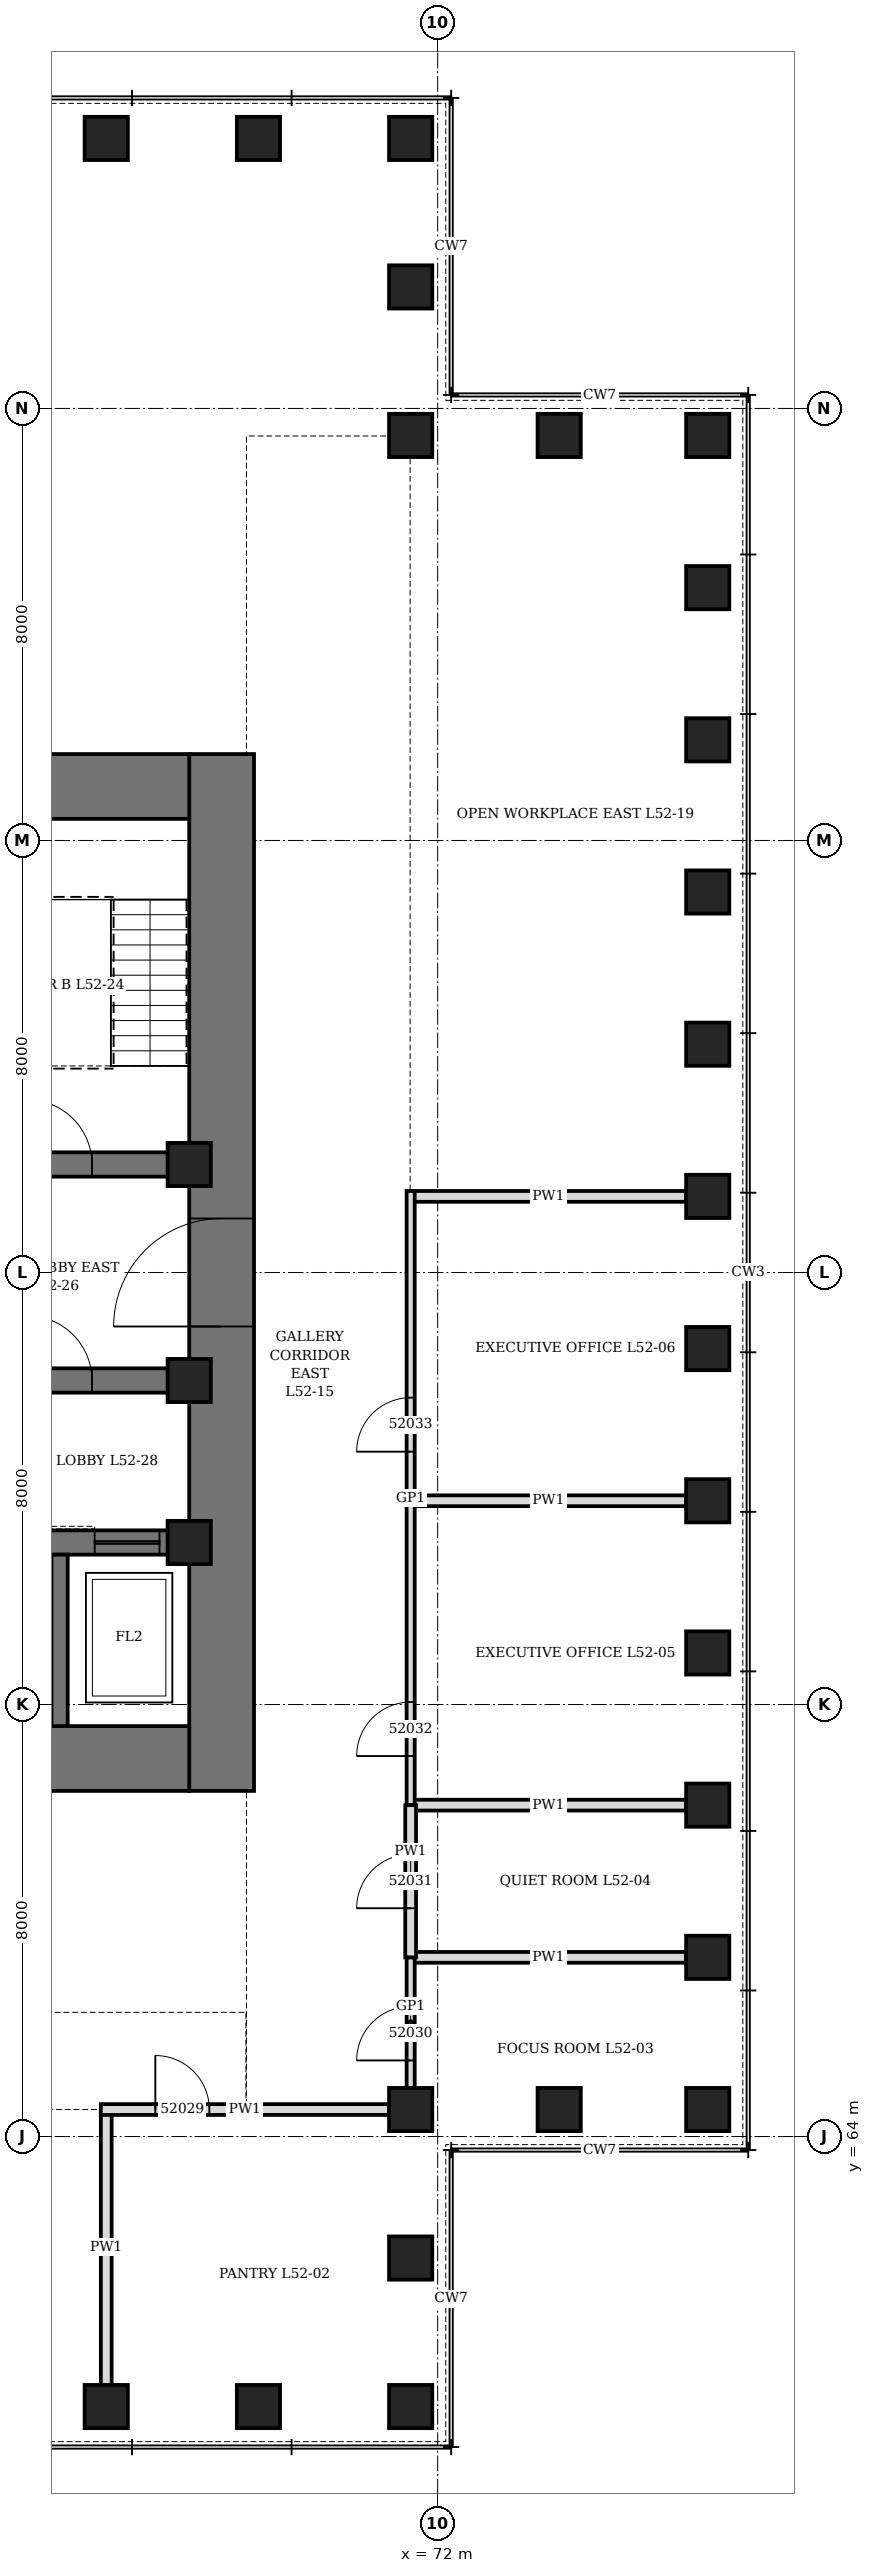
"""IFC4 building model, lengths in metres.
Left out: names, types, materials, properties, quantities, classifications, styles, units other than length and angle.
Written with IfcOpenShell. Run it as: python <this file> out.ifc"""

import sys

from ifc_helpers import new_model, si_unit, direction, frame, frame_2d, origin, origin_2d, place, context, subcontext, project, spatial, rectangle, hollow_rectangle, extrude, element, fill, save


model = new_model("IFC4")
c1 = context("Model", 3, precision=1e-05, world=origin(), true_north=direction((0.0, 1.0)))
c2 = subcontext(c1, "Body", "Model", "MODEL_VIEW")
j1 = project(units=[si_unit("LENGTHUNIT", "METRE"), si_unit("PLANEANGLEUNIT", "RADIAN")], contexts=[c1])
p1 = place(None, origin())
s1 = spatial("IfcSite", under=j1, at=p1, CompositionType="ELEMENT")
p2 = place(p1, origin())
s2 = spatial("IfcBuilding", under=s1, at=p2, CompositionType="ELEMENT")
p3 = place(p2, frame((0.0, 0.0, 231.7)))
s3 = spatial("IfcBuildingStorey", under=s2, at=p3, CompositionType="ELEMENT", Elevation=231.7)
for number, where, z_axis, x_axis in (
    (1, (65.864, 59.0, 0.0), (0.0, 0.0, 1.0), (1.0, 0.0, 0.0)),
    (2, (68.682, 59.0, 0.0), (0.0, 0.0, 1.0), (1.0, 0.0, 0.0)),
    (3, (71.5, 59.0, 0.0), (0.0, 0.0, 1.0), (0.0, 1.0, 0.0)),
    (4, (71.5, 61.75, 0.0), (0.0, 0.0, 1.0), (0.0, 1.0, 0.0)),
    (5, (71.5, 64.5, 0.0), (0.0, 0.0, 1.0), (1.0, 0.0, 0.0)),
    (6, (74.25, 64.5, 0.0), (0.0, 0.0, 1.0), (1.0, 0.0, 0.0)),
    (7, (77.0, 64.5, 0.0), (0.0, 0.0, 1.0), (0.0, 1.0, 0.0)),
    (8, (77.0, 67.318, 0.0), (0.0, 0.0, 1.0), (0.0, 1.0, 0.0)),
    (9, (77.0, 70.136, 0.0), (0.0, 0.0, 1.0), (0.0, 1.0, 0.0)),
    (10, (77.0, 72.955, 0.0), (0.0, 0.0, 1.0), (0.0, 1.0, 0.0)),
    (11, (77.0, 75.773, 0.0), (0.0, 0.0, 1.0), (0.0, 1.0, 0.0)),
    (12, (77.0, 78.591, 0.0), (0.0, 0.0, 1.0), (0.0, 1.0, 0.0)),
    (13, (77.0, 81.409, 0.0), (0.0, 0.0, 1.0), (0.0, 1.0, 0.0)),
    (14, (77.0, 84.227, 0.0), (0.0, 0.0, 1.0), (0.0, 1.0, 0.0)),
    (15, (77.0, 87.045, 0.0), (0.0, 0.0, 1.0), (0.0, 1.0, 0.0)),
    (16, (77.0, 89.864, 0.0), (0.0, 0.0, 1.0), (0.0, 1.0, 0.0)),
    (17, (77.0, 92.682, 0.0), (0.0, 0.0, 1.0), (0.0, 1.0, 0.0)),
    (18, (77.0, 95.5, 0.0), (0.0, 0.0, 1.0), (1.0, 0.0, 0.0)),
    (19, (74.25, 95.5, 0.0), (0.0, 0.0, 1.0), (1.0, 0.0, 0.0)),
    (20, (71.5, 95.5, 0.0), (0.0, 0.0, 1.0), (0.0, 1.0, 0.0)),
    (21, (71.5, 98.25, 0.0), (0.0, 0.0, 1.0), (0.0, 1.0, 0.0)),
    (22, (71.5, 101.0, 0.0), (0.0, 0.0, 1.0), (1.0, 0.0, 0.0)),
    (23, (68.682, 101.0, 0.0), (0.0, 0.0, 1.0), (1.0, 0.0, 0.0)),
    (24, (65.864, 101.0, 0.0), (0.0, 0.0, 1.0), (1.0, 0.0, 0.0)),
):
    element("IfcColumn", number, at=place(p3, frame(where, z_axis=z_axis, x_axis=x_axis)), inside=s3, PredefinedType="COLUMN", context=c2, shape_type="SweptSolid", body=[
        extrude(hollow_rectangle(XDim=0.8, YDim=0.8, WallThickness=0.08, at=origin_2d()), origin(), (0.0, 0.0, 1.0), 4.2),
    ])
p4 = place(p3, frame((68.0, 70.4, 0.0), z_axis=(0.0, 0.0, 1.0), x_axis=(0.0, 1.0, 0.0)))
e25 = element("IfcWall", 25, at=p4, inside=s3, PredefinedType="SHEAR", context=c2, shape_type="SweptSolid", body=[
    extrude(rectangle(XDim=19.2, YDim=1.2, at=frame_2d((9.6, 0.0))), origin(), (0.0, 0.0, 1.0), 4.2),
])
p5 = place(p4, frame((8.6, 0.0, 0.0)))
e26 = element("IfcOpeningElement", 26, at=p5, cuts=e25, PredefinedType="OPENING", context=c2, shape_type="SweptSolid", body=[
    extrude(rectangle(XDim=2.0, YDim=2.4, at=frame_2d((1.0, 1.2))), frame((0.0, 0.61, 0.0), z_axis=(0.0, -1.0, 0.0), x_axis=(1.0, 0.0, 0.0)), (0.0, 0.0, 1.0), 1.22),
])
p6 = place(p3, frame((44.6, 71.0, 0.0), z_axis=(0.0, 0.0, 1.0), x_axis=(1.0, 0.0, 0.0)))
e27 = element("IfcWall", 27, at=p6, inside=s3, PredefinedType="SHEAR", context=c2, shape_type="SweptSolid", body=[
    extrude(rectangle(XDim=22.8, YDim=1.2, at=frame_2d((11.4, 0.0))), origin(), (0.0, 0.0, 1.0), 4.2),
])
p7 = place(p6, frame((6.35, 0.0, 0.0)))
e28 = element("IfcOpeningElement", 28, at=p7, cuts=e27, PredefinedType="OPENING", context=c2, shape_type="SweptSolid", body=[
    extrude(rectangle(XDim=1.1, YDim=2.2, at=frame_2d((0.55, 1.1))), frame((0.0, 0.61, 0.0), z_axis=(0.0, -1.0, 0.0), x_axis=(1.0, 0.0, 0.0)), (0.0, 0.0, 1.0), 1.22),
])
p8 = place(p6, frame((9.35, 0.0, 0.0)))
e29 = element("IfcOpeningElement", 29, at=p8, cuts=e27, PredefinedType="OPENING", context=c2, shape_type="SweptSolid", body=[
    extrude(rectangle(XDim=1.1, YDim=2.2, at=frame_2d((0.55, 1.1))), frame((0.0, 0.61, 0.0), z_axis=(0.0, -1.0, 0.0), x_axis=(1.0, 0.0, 0.0)), (0.0, 0.0, 1.0), 1.22),
])
p9 = place(p6, frame((12.35, 0.0, 0.0)))
e30 = element("IfcOpeningElement", 30, at=p9, cuts=e27, PredefinedType="OPENING", context=c2, shape_type="SweptSolid", body=[
    extrude(rectangle(XDim=1.1, YDim=2.2, at=frame_2d((0.55, 1.1))), frame((0.0, 0.61, 0.0), z_axis=(0.0, -1.0, 0.0), x_axis=(1.0, 0.0, 0.0)), (0.0, 0.0, 1.0), 1.22),
])
p10 = place(p6, frame((15.35, 0.0, 0.0)))
e31 = element("IfcOpeningElement", 31, at=p10, cuts=e27, PredefinedType="OPENING", context=c2, shape_type="SweptSolid", body=[
    extrude(rectangle(XDim=1.1, YDim=2.2, at=frame_2d((0.55, 1.1))), frame((0.0, 0.61, 0.0), z_axis=(0.0, -1.0, 0.0), x_axis=(1.0, 0.0, 0.0)), (0.0, 0.0, 1.0), 1.22),
])
p11 = place(p3, frame((44.6, 89.0, 0.0), z_axis=(0.0, 0.0, 1.0), x_axis=(1.0, 0.0, 0.0)))
e32 = element("IfcWall", 32, at=p11, inside=s3, PredefinedType="SHEAR", context=c2, shape_type="SweptSolid", body=[
    extrude(rectangle(XDim=22.8, YDim=1.2, at=frame_2d((11.4, 0.0))), origin(), (0.0, 0.0, 1.0), 4.2),
])
p12 = place(p11, frame((7.9, 0.0, 0.0)))
e33 = element("IfcOpeningElement", 33, at=p12, cuts=e32, PredefinedType="OPENING", context=c2, shape_type="SweptSolid", body=[
    extrude(rectangle(XDim=1.0, YDim=2.1, at=frame_2d((0.5, 1.05))), frame((0.0, 0.61, 0.0), z_axis=(0.0, -1.0, 0.0), x_axis=(1.0, 0.0, 0.0)), (0.0, 0.0, 1.0), 1.22),
])
p13 = place(p11, frame((13.012, 0.0, 0.0)))
e34 = element("IfcOpeningElement", 34, at=p13, cuts=e32, PredefinedType="OPENING", context=c2, shape_type="SweptSolid", body=[
    extrude(rectangle(XDim=0.9, YDim=2.1, at=frame_2d((0.45, 1.05))), frame((0.0, 0.61, 0.0), z_axis=(0.0, -1.0, 0.0), x_axis=(1.0, 0.0, 0.0)), (0.0, 0.0, 1.0), 1.22),
])
p14 = place(p3, frame((62.225, 75.0, 0.0), z_axis=(0.0, 0.0, 1.0), x_axis=(1.0, 0.0, 0.0)))
e35 = element("IfcWall", 35, at=p14, inside=s3, PredefinedType="SHEAR", context=c2, shape_type="SweptSolid", body=[
    extrude(rectangle(XDim=5.175, YDim=0.45, at=frame_2d((2.587, 0.0))), origin(), (0.0, 0.0, 1.0), 4.2),
])
p15 = place(p14, frame((0.675, 0.0, 0.0)))
e36 = element("IfcOpeningElement", 36, at=p15, cuts=e35, PredefinedType="OPENING", context=c2, shape_type="SweptSolid", body=[
    extrude(rectangle(XDim=1.2, YDim=2.2, at=frame_2d((0.6, 1.1))), frame((0.0, 0.235, 0.0), z_axis=(0.0, -1.0, 0.0), x_axis=(1.0, 0.0, 0.0)), (0.0, 0.0, 1.0), 0.47),
])
p16 = place(p14, frame((3.425, 0.0, 0.0)))
e37 = element("IfcOpeningElement", 37, at=p16, cuts=e35, PredefinedType="OPENING", context=c2, shape_type="SweptSolid", body=[
    extrude(rectangle(XDim=1.2, YDim=2.2, at=frame_2d((0.6, 1.1))), frame((0.0, 0.235, 0.0), z_axis=(0.0, -1.0, 0.0), x_axis=(1.0, 0.0, 0.0)), (0.0, 0.0, 1.0), 0.47),
])
p17 = place(p3, frame((62.225, 78.0, 0.0), z_axis=(0.0, 0.0, 1.0), x_axis=(1.0, 0.0, 0.0)))
e38 = element("IfcWall", 38, at=p17, inside=s3, PredefinedType="SHEAR", context=c2, shape_type="SweptSolid", body=[
    extrude(rectangle(XDim=5.175, YDim=0.45, at=frame_2d((2.587, 0.0))), origin(), (0.0, 0.0, 1.0), 4.2),
])
p18 = place(p17, frame((2.175, 0.0, 0.0)))
e39 = element("IfcOpeningElement", 39, at=p18, cuts=e38, PredefinedType="OPENING", context=c2, shape_type="SweptSolid", body=[
    extrude(rectangle(XDim=1.2, YDim=2.1, at=frame_2d((0.6, 1.05))), frame((0.0, 0.235, 0.0), z_axis=(0.0, -1.0, 0.0), x_axis=(1.0, 0.0, 0.0)), (0.0, 0.0, 1.0), 0.47),
])
p19 = place(p3, frame((62.225, 82.0, 0.0), z_axis=(0.0, 0.0, 1.0), x_axis=(1.0, 0.0, 0.0)))
e40 = element("IfcWall", 40, at=p19, inside=s3, PredefinedType="SHEAR", context=c2, shape_type="SweptSolid", body=[
    extrude(rectangle(XDim=5.175, YDim=0.45, at=frame_2d((2.587, 0.0))), origin(), (0.0, 0.0, 1.0), 4.2),
])
p20 = place(p19, frame((2.175, 0.0, 0.0)))
e41 = element("IfcOpeningElement", 41, at=p20, cuts=e40, PredefinedType="OPENING", context=c2, shape_type="SweptSolid", body=[
    extrude(rectangle(XDim=1.2, YDim=2.1, at=frame_2d((0.6, 1.05))), frame((0.0, 0.235, 0.0), z_axis=(0.0, -1.0, 0.0), x_axis=(1.0, 0.0, 0.0)), (0.0, 0.0, 1.0), 0.47),
])
p21 = place(p3, frame((65.0, 71.6, 0.0), z_axis=(0.0, 0.0, 1.0), x_axis=(0.0, 1.0, 0.0)))
e42 = element("IfcWall", 42, at=p21, inside=s3, PredefinedType="SHEAR", context=c2, shape_type="SweptSolid", body=[
    extrude(rectangle(XDim=3.175, YDim=0.3, at=frame_2d((1.587, 0.0))), origin(), (0.0, 0.0, 1.0), 4.2),
])
for number, where, z_axis, x_axis in (
    (43, (67.4, 75.0, 0.0), (0.0, 0.0, 1.0), (1.0, 0.0, 0.0)),
    (44, (67.4, 78.0, 0.0), (0.0, 0.0, 1.0), (1.0, 0.0, 0.0)),
    (45, (67.4, 82.0, 0.0), (0.0, 0.0, 1.0), (1.0, 0.0, 0.0)),
):
    element("IfcColumn", number, at=place(p3, frame(where, z_axis=z_axis, x_axis=x_axis)), inside=s3, PredefinedType="COLUMN", context=c2, shape_type="SweptSolid", body=[
        extrude(hollow_rectangle(XDim=0.8, YDim=0.8, WallThickness=0.1, at=origin_2d()), origin(), (0.0, 0.0, 1.0), 4.2),
    ])
for number, where, z_axis, x_axis in (
    (46, (65.864, 59.4, 0.0), (0.0, 0.0, 1.0), (0.0, 1.0, 0.0)),
    (47, (71.5, 67.318, 0.0), (0.0, 0.0, 1.0), (1.0, 0.0, 0.0)),
    (48, (71.5, 70.136, 0.0), (0.0, 0.0, 1.0), (1.0, 0.0, 0.0)),
    (49, (71.5, 75.773, 0.0), (0.0, 0.0, 1.0), (1.0, 0.0, 0.0)),
    (50, (71.5, 81.409, 0.0), (0.0, 0.0, 1.0), (1.0, 0.0, 0.0)),
):
    element("IfcWall", number, at=place(p3, frame(where, z_axis=z_axis, x_axis=x_axis)), inside=s3, PredefinedType="PARTITIONING", context=c2, shape_type="SweptSolid", body=[
        extrude(rectangle(XDim=5.1, YDim=0.2, at=frame_2d((2.55, 0.0))), origin(), (0.0, 0.0, 1.0), 3.428),
    ])
p22 = place(p3, frame((65.764, 64.5, 0.0), z_axis=(0.0, 0.0, 1.0), x_axis=(1.0, 0.0, 0.0)))
e51 = element("IfcWall", 51, at=p22, inside=s3, PredefinedType="PARTITIONING", context=c2, shape_type="SweptSolid", body=[
    extrude(rectangle(XDim=5.336, YDim=0.2, at=frame_2d((2.668, 0.0))), origin(), (0.0, 0.0, 1.0), 4.04),
])
p23 = place(p22, frame((1.009, 0.0, 0.0)))
e52 = element("IfcOpeningElement", 52, at=p23, cuts=e51, PredefinedType="OPENING", context=c2, shape_type="SweptSolid", body=[
    extrude(rectangle(XDim=1.0, YDim=2.1, at=frame_2d((0.5, 1.05))), frame((0.0, 0.11, 0.0), z_axis=(0.0, -1.0, 0.0), x_axis=(1.0, 0.0, 0.0)), (0.0, 0.0, 1.0), 0.22),
])
p24 = place(p3, frame((71.5, 64.9, 0.0), z_axis=(0.0, 0.0, 1.0), x_axis=(0.0, 1.0, 0.0)))
e53 = element("IfcWall", 53, at=p24, inside=s3, PredefinedType="PARTITIONING", context=c2, shape_type="SweptSolid", body=[
    extrude(rectangle(XDim=2.418, YDim=0.15, at=frame_2d((1.209, 0.0))), origin(), (0.0, 0.0, 1.0), 4.04),
])
p25 = place(p24, frame((0.509, 0.0, 0.0)))
e54 = element("IfcOpeningElement", 54, at=p25, cuts=e53, PredefinedType="OPENING", context=c2, shape_type="SweptSolid", body=[
    extrude(rectangle(XDim=1.0, YDim=2.4, at=frame_2d((0.5, 1.2))), frame((0.0, 0.085, 0.0), z_axis=(0.0, -1.0, 0.0), x_axis=(1.0, 0.0, 0.0)), (0.0, 0.0, 1.0), 0.17),
])
p26 = place(p3, frame((71.5, 70.136, 0.0), z_axis=(0.0, 0.0, 1.0), x_axis=(0.0, 1.0, 0.0)))
e55 = element("IfcWall", 55, at=p26, inside=s3, PredefinedType="PARTITIONING", context=c2, shape_type="SweptSolid", body=[
    extrude(rectangle(XDim=11.373, YDim=0.15, at=frame_2d((5.686, 0.0))), origin(), (0.0, 0.0, 1.0), 4.04),
])
p27 = place(p26, frame((0.909, 0.0, 0.0)))
e56 = element("IfcOpeningElement", 56, at=p27, cuts=e55, PredefinedType="OPENING", context=c2, shape_type="SweptSolid", body=[
    extrude(rectangle(XDim=1.0, YDim=2.1, at=frame_2d((0.5, 1.05))), frame((0.0, 0.085, 0.0), z_axis=(0.0, -1.0, 0.0), x_axis=(1.0, 0.0, 0.0)), (0.0, 0.0, 1.0), 0.17),
])
p28 = place(p26, frame((6.545, 0.0, 0.0)))
e57 = element("IfcOpeningElement", 57, at=p28, cuts=e55, PredefinedType="OPENING", context=c2, shape_type="SweptSolid", body=[
    extrude(rectangle(XDim=1.0, YDim=2.1, at=frame_2d((0.5, 1.05))), frame((0.0, 0.085, 0.0), z_axis=(0.0, -1.0, 0.0), x_axis=(1.0, 0.0, 0.0)), (0.0, 0.0, 1.0), 0.17),
])
p29 = place(p3, frame((71.5, 67.318, 0.0), z_axis=(0.0, 0.0, 1.0), x_axis=(0.0, 1.0, 0.0)))
e58 = element("IfcWall", 58, at=p29, inside=s3, PredefinedType="PARTITIONING", context=c2, shape_type="SweptSolid", body=[
    extrude(rectangle(XDim=2.818, YDim=0.2, at=frame_2d((1.409, 0.0))), origin(), (0.0, 0.0, 1.0), 4.04),
])
p30 = place(p29, frame((0.909, 0.0, 0.0)))
e59 = element("IfcOpeningElement", 59, at=p30, cuts=e58, PredefinedType="OPENING", context=c2, shape_type="SweptSolid", body=[
    extrude(rectangle(XDim=1.0, YDim=2.1, at=frame_2d((0.5, 1.05))), frame((0.0, 0.11, 0.0), z_axis=(0.0, -1.0, 0.0), x_axis=(1.0, 0.0, 0.0)), (0.0, 0.0, 1.0), 0.22),
])
p31 = place(p20, origin())
e60 = element("IfcDoor", 60, at=p31, inside=s3, OperationType="SINGLE_SWING_LEFT", PredefinedType="DOOR", context=c2, shape_type="SweptSolid", body=[
    extrude(rectangle(XDim=1.2, YDim=2.1, at=frame_2d((0.6, 1.05))), frame((0.0, 0.225, 0.0), z_axis=(0.0, -1.0, 0.0), x_axis=(1.0, 0.0, 0.0)), (0.0, 0.0, 1.0), 0.449),
])
fill(e41, e60)
p32 = place(p5, origin())
e61 = element("IfcDoor", 61, at=p32, inside=s3, OperationType="DOUBLE_DOOR_SINGLE_SWING", PredefinedType="DOOR", context=c2, shape_type="SweptSolid", body=[
    extrude(rectangle(XDim=2.0, YDim=2.4, at=frame_2d((1.0, 1.2))), frame((0.0, 0.35, 0.0), z_axis=(0.0, -1.0, 0.0), x_axis=(1.0, 0.0, 0.0)), (0.0, 0.0, 1.0), 0.7),
])
fill(e26, e61)
p33 = place(p18, origin())
e62 = element("IfcDoor", 62, at=p33, inside=s3, OperationType="SINGLE_SWING_RIGHT", PredefinedType="DOOR", context=c2, shape_type="SweptSolid", body=[
    extrude(rectangle(XDim=1.2, YDim=2.1, at=frame_2d((0.6, 1.05))), frame((0.0, 0.225, 0.0), z_axis=(0.0, -1.0, 0.0), x_axis=(1.0, 0.0, 0.0)), (0.0, 0.0, 1.0), 0.449),
])
fill(e39, e62)
p34 = place(p16, origin())
e63 = element("IfcDoor", 63, at=p34, inside=s3, OperationType="SLIDING_TO_LEFT", PredefinedType="DOOR", context=c2, shape_type="SweptSolid", body=[
    extrude(rectangle(XDim=1.2, YDim=2.2, at=frame_2d((0.6, 1.1))), frame((0.0, 0.225, 0.0), z_axis=(0.0, -1.0, 0.0), x_axis=(1.0, 0.0, 0.0)), (0.0, 0.0, 1.0), 0.449),
])
fill(e37, e63)
p35 = place(p23, origin())
e64 = element("IfcDoor", 64, at=p35, inside=s3, OperationType="SINGLE_SWING_LEFT", PredefinedType="DOOR", context=c2, shape_type="SweptSolid", body=[
    extrude(rectangle(XDim=1.0, YDim=2.1, at=frame_2d((0.5, 1.05))), frame((0.0, 0.1, 0.0), z_axis=(0.0, -1.0, 0.0), x_axis=(1.0, 0.0, 0.0)), (0.0, 0.0, 1.0), 0.199),
])
fill(e52, e64)
p36 = place(p25, origin())
e65 = element("IfcDoor", 65, at=p36, inside=s3, OperationType="SINGLE_SWING_RIGHT", PredefinedType="DOOR", context=c2, shape_type="SweptSolid", body=[
    extrude(rectangle(XDim=1.0, YDim=2.4, at=frame_2d((0.5, 1.2))), frame((0.0, 0.075, 0.0), z_axis=(0.0, -1.0, 0.0), x_axis=(1.0, 0.0, 0.0)), (0.0, 0.0, 1.0), 0.149),
])
fill(e54, e65)
p37 = place(p30, origin())
e66 = element("IfcDoor", 66, at=p37, inside=s3, OperationType="SINGLE_SWING_LEFT", PredefinedType="DOOR", context=c2, shape_type="SweptSolid", body=[
    extrude(rectangle(XDim=1.0, YDim=2.1, at=frame_2d((0.5, 1.05))), frame((0.0, 0.1, 0.0), z_axis=(0.0, -1.0, 0.0), x_axis=(1.0, 0.0, 0.0)), (0.0, 0.0, 1.0), 0.199),
])
fill(e59, e66)
p38 = place(p27, origin())
e67 = element("IfcDoor", 67, at=p38, inside=s3, OperationType="SINGLE_SWING_LEFT", PredefinedType="DOOR", context=c2, shape_type="SweptSolid", body=[
    extrude(rectangle(XDim=1.0, YDim=2.1, at=frame_2d((0.5, 1.05))), frame((0.0, 0.075, 0.0), z_axis=(0.0, -1.0, 0.0), x_axis=(1.0, 0.0, 0.0)), (0.0, 0.0, 1.0), 0.149),
])
fill(e56, e67)
p39 = place(p28, origin())
e68 = element("IfcDoor", 68, at=p39, inside=s3, OperationType="SINGLE_SWING_LEFT", PredefinedType="DOOR", context=c2, shape_type="SweptSolid", body=[
    extrude(rectangle(XDim=1.0, YDim=2.1, at=frame_2d((0.5, 1.05))), frame((0.0, 0.075, 0.0), z_axis=(0.0, -1.0, 0.0), x_axis=(1.0, 0.0, 0.0)), (0.0, 0.0, 1.0), 0.149),
])
fill(e57, e68)
save(model, sys.argv[1])
